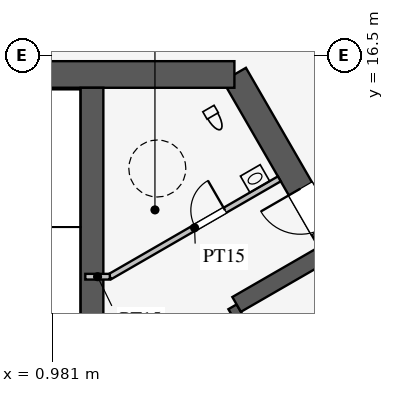
"""IFC4 building model, lengths in metres.
Left out: names, types, materials, properties, quantities, classifications, styles, units other than length and angle.
Written with IfcOpenShell. Run it as: python <this file> out.ifc"""

import sys

from ifc_helpers import new_model, si_unit, direction, frame, frame_2d, origin, place, context, subcontext, project, spatial, rectangle, extrude, element, fill, save


model = new_model("IFC4")
c1 = context("Model", 3, precision=1e-05, world=origin(), true_north=direction((0.0, 1.0)))
c2 = subcontext(c1, "Body", "Model", "MODEL_VIEW")
j1 = project(units=[si_unit("LENGTHUNIT", "METRE"), si_unit("PLANEANGLEUNIT", "RADIAN")], contexts=[c1])
p1 = place(None, origin())
s1 = spatial("IfcSite", under=j1, at=p1, CompositionType="ELEMENT")
p2 = place(p1, origin())
s2 = spatial("IfcBuilding", under=s1, at=p2, CompositionType="ELEMENT")
p3 = place(p2, frame((0.0, 0.0, 280.5)))
s3 = spatial("IfcBuildingStorey", under=s2, at=p3, CompositionType="ELEMENT", Elevation=280.5)
p4 = place(p3, frame((16.743, -3.0, 0.0), z_axis=(0.0, 0.0, 1.0), x_axis=(-0.500002442456, 0.866023993627, 0.0)))
e1 = element("IfcWall", 1, at=p4, inside=s3, PredefinedType="SHEAR", context=c2, shape_type="SweptSolid", body=[
    extrude(rectangle(XDim=21.939, YDim=0.7, at=frame_2d((10.97, 0.0))), origin(), (0.0, 0.0, 1.0), 4.2),
])
p5 = place(p4, frame((17.27, 0.0, 0.0)))
e2 = element("IfcOpeningElement", 2, at=p5, cuts=e1, PredefinedType="OPENING", context=c2, shape_type="SweptSolid", body=[
    extrude(rectangle(XDim=1.2, YDim=2.1, at=frame_2d((0.6, 1.05))), frame((0.0, 0.36, 0.0), z_axis=(0.0, -1.0, 0.0), x_axis=(1.0, 0.0, 0.0)), (0.0, 0.0, 1.0), 0.72),
])
p6 = place(p4, frame((3.47, 0.0, 0.0)))
e3 = element("IfcOpeningElement", 3, at=p6, cuts=e1, PredefinedType="OPENING", context=c2, shape_type="SweptSolid", body=[
    extrude(rectangle(XDim=1.2, YDim=2.1, at=frame_2d((0.6, 1.05))), frame((0.0, 0.36, 0.0), z_axis=(0.0, -1.0, 0.0), x_axis=(1.0, 0.0, 0.0)), (0.0, 0.0, 1.0), 0.72),
])
p7 = place(p3, frame((5.773, 16.0, 0.0), z_axis=(0.0, 0.0, 1.0), x_axis=(-1.0, 0.0, 0.0)))
e4 = element("IfcWall", 4, at=p7, inside=s3, PredefinedType="SHEAR", context=c2, shape_type="SweptSolid", body=[
    extrude(rectangle(XDim=11.547, YDim=0.7, at=frame_2d((5.773, 0.0))), origin(), (0.0, 0.0, 1.0), 4.2),
])
p8 = place(p3, frame((11.424, 0.014, 0.0), z_axis=(0.0, 0.0, 1.0), x_axis=(-0.500001763848, 0.866024385424, 0.0)))
e5 = element("IfcWall", 5, at=p8, inside=s3, PredefinedType="SHEAR", context=c2, shape_type="SweptSolid", body=[
    extrude(rectangle(XDim=11.4, YDim=0.25, at=frame_2d((5.7, 0.0))), origin(), (0.0, 0.0, 1.0), 4.2),
])
p9 = place(p8, frame((0.975, 0.0, 0.0)))
e6 = element("IfcOpeningElement", 6, at=p9, cuts=e5, PredefinedType="OPENING", context=c2, shape_type="SweptSolid", body=[
    extrude(rectangle(XDim=0.9, YDim=2.1, at=frame_2d((0.45, 1.05))), frame((0.0, 0.135, 0.0), z_axis=(0.0, -1.0, 0.0), x_axis=(1.0, 0.0, 0.0)), (0.0, 0.0, 1.0), 0.27),
])
p10 = place(p8, frame((3.825, 0.0, 0.0)))
e7 = element("IfcOpeningElement", 7, at=p10, cuts=e5, PredefinedType="OPENING", context=c2, shape_type="SweptSolid", body=[
    extrude(rectangle(XDim=0.9, YDim=2.1, at=frame_2d((0.45, 1.05))), frame((0.0, 0.135, 0.0), z_axis=(0.0, -1.0, 0.0), x_axis=(1.0, 0.0, 0.0)), (0.0, 0.0, 1.0), 0.27),
])
p11 = place(p8, frame((6.675, 0.0, 0.0)))
e8 = element("IfcOpeningElement", 8, at=p11, cuts=e5, PredefinedType="OPENING", context=c2, shape_type="SweptSolid", body=[
    extrude(rectangle(XDim=0.9, YDim=2.1, at=frame_2d((0.45, 1.05))), frame((0.0, 0.135, 0.0), z_axis=(0.0, -1.0, 0.0), x_axis=(1.0, 0.0, 0.0)), (0.0, 0.0, 1.0), 0.27),
])
p12 = place(p8, frame((9.525, 0.0, 0.0)))
e9 = element("IfcOpeningElement", 9, at=p12, cuts=e5, PredefinedType="OPENING", context=c2, shape_type="SweptSolid", body=[
    extrude(rectangle(XDim=0.9, YDim=2.1, at=frame_2d((0.45, 1.05))), frame((0.0, 0.135, 0.0), z_axis=(0.0, -1.0, 0.0), x_axis=(1.0, 0.0, 0.0)), (0.0, 0.0, 1.0), 0.27),
])
p13 = place(p3, frame((5.832, 9.949, 0.0), z_axis=(0.0, 0.0, 1.0), x_axis=(0.866036909293, 0.499980071345, 0.0)))
e10 = element("IfcWall", 10, at=p13, inside=s3, PredefinedType="SHEAR", context=c2, shape_type="SweptSolid", body=[
    extrude(rectangle(XDim=2.625, YDim=0.45, at=frame_2d((1.312, 0.0))), origin(), (0.0, 0.0, 1.0), 4.2),
])
p14 = place(p3, frame((2.025, 6.525, 0.0), z_axis=(0.0, 0.0, 1.0), x_axis=(0.0, 1.0, 0.0)))
e11 = element("IfcWall", 11, at=p14, inside=s3, PredefinedType="SHEAR", context=c2, shape_type="SweptSolid", body=[
    extrude(rectangle(XDim=9.125, YDim=0.6, at=frame_2d((4.562, 0.0))), origin(), (0.0, 0.0, 1.0), 4.2),
])
p15 = place(p3, frame((2.495, 10.678, 0.0), z_axis=(0.0, 0.0, 1.0), x_axis=(0.866037967349, 0.499978238636, 0.0)))
e12 = element("IfcWall", 12, at=p15, inside=s3, PredefinedType="PARTITIONING", context=c2, shape_type="SweptSolid", body=[
    extrude(rectangle(XDim=5.15, YDim=0.15, at=frame_2d((2.575, 0.0))), origin(), (0.0, 0.0, 1.0), 4.0),
])
p16 = place(p15, frame((2.6, 0.0, 0.0)))
e13 = element("IfcOpeningElement", 13, at=p16, cuts=e12, PredefinedType="OPENING", context=c2, shape_type="SweptSolid", body=[
    extrude(rectangle(XDim=0.9, YDim=2.1, at=frame_2d((0.45, 1.05))), frame((0.0, 0.085, 0.0), z_axis=(0.0, -1.0, 0.0), x_axis=(1.0, 0.0, 0.0)), (0.0, 0.0, 1.0), 0.17),
])
p17 = place(p3, frame((2.495, 10.678, 0.0), z_axis=(0.0, 0.0, 1.0), x_axis=(-1.0, 0.0, 0.0)))
e14 = element("IfcWall", 14, at=p17, inside=s3, PredefinedType="PARTITIONING", context=c2, shape_type="SweptSolid", body=[
    extrude(rectangle(XDim=0.645, YDim=0.15, at=frame_2d((0.323, 0.0))), origin(), (0.0, 0.0, 1.0), 4.0),
])
p18 = place(p16, origin())
e15 = element("IfcDoor", 15, at=p18, inside=s3, OperationType="SINGLE_SWING_RIGHT", PredefinedType="DOOR", context=c2, shape_type="SweptSolid", body=[
    extrude(rectangle(XDim=0.9, YDim=2.1, at=frame_2d((0.45, 1.05))), frame((0.0, 0.025, 0.0), z_axis=(0.0, -1.0, 0.0), x_axis=(1.0, 0.0, 0.0)), (0.0, 0.0, 1.0), 0.05),
])
fill(e13, e15)
p19 = place(p5, origin())
e16 = element("IfcDoor", 16, at=p19, inside=s3, OperationType="SINGLE_SWING_RIGHT", PredefinedType="DOOR", context=c2, shape_type="SweptSolid", body=[
    extrude(rectangle(XDim=1.2, YDim=2.1, at=frame_2d((0.6, 1.05))), frame((0.0, 0.025, 0.0), z_axis=(0.0, -1.0, 0.0), x_axis=(1.0, 0.0, 0.0)), (0.0, 0.0, 1.0), 0.05),
])
fill(e2, e16)
save(model, sys.argv[1])
